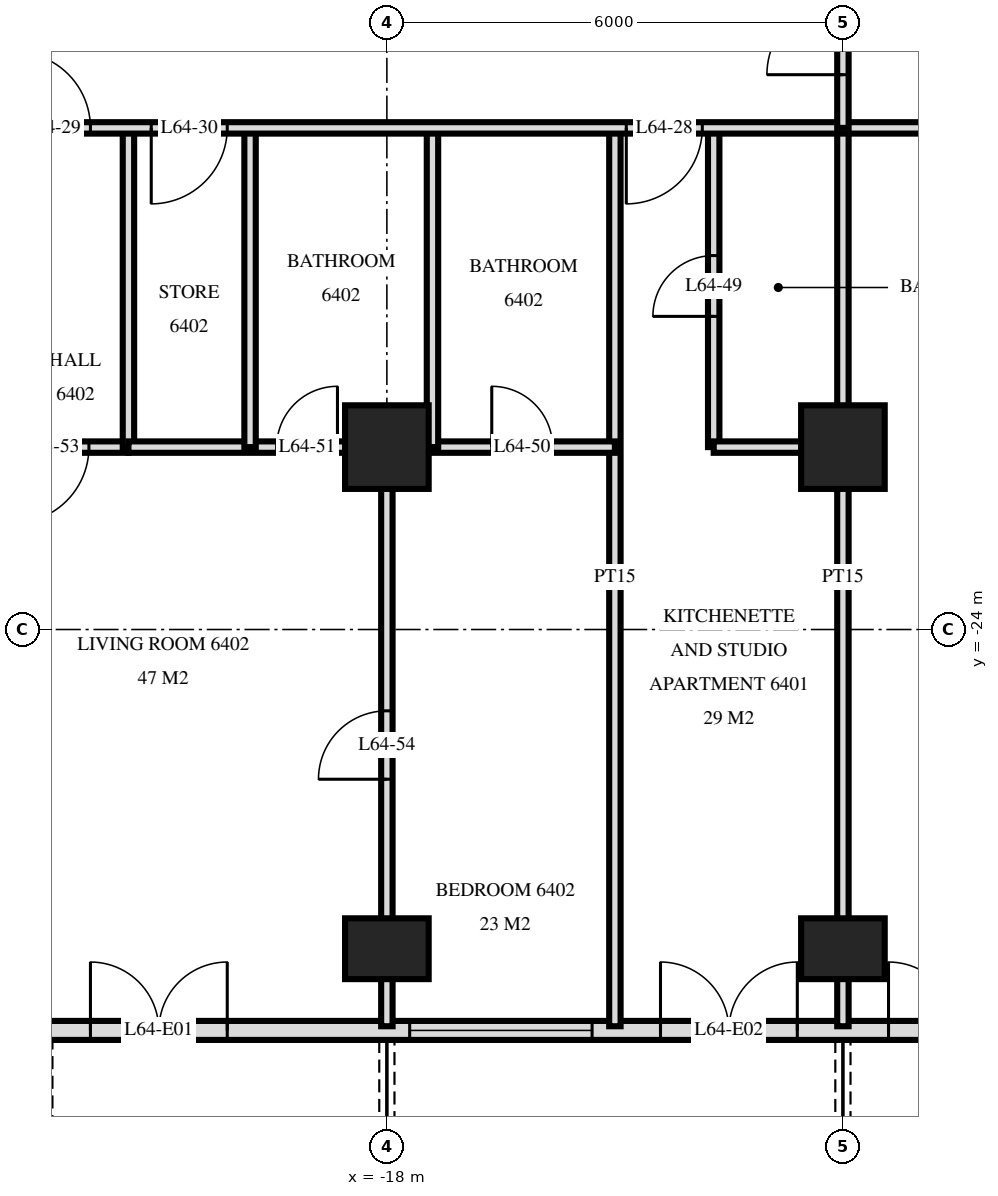
"""IFC4 building model, lengths in metres.
Left out: names, types, materials, properties, quantities, classifications, styles, units other than length and angle.
Written with IfcOpenShell. Run it as: python <this file> out.ifc"""

import sys

from ifc_helpers import new_model, si_unit, direction, frame, frame_2d, origin, origin_2d, place, context, subcontext, project, spatial, rectangle, extrude, element, fill, save


model = new_model("IFC4")
c1 = context("Model", 3, precision=1e-05, world=origin(), true_north=direction((0.0, 1.0)))
c2 = subcontext(c1, "Body", "Model", "MODEL_VIEW")
j1 = project(units=[si_unit("LENGTHUNIT", "METRE"), si_unit("PLANEANGLEUNIT", "RADIAN")], contexts=[c1])
p1 = place(None, origin())
s1 = spatial("IfcSite", under=j1, at=p1, CompositionType="ELEMENT")
p2 = place(p1, origin())
s2 = spatial("IfcBuilding", under=s1, at=p2, CompositionType="ELEMENT")
p3 = place(p2, frame((0.0, 0.0, 243.1)))
s3 = spatial("IfcBuildingStorey", under=s2, at=p3, CompositionType="ELEMENT", Elevation=243.1)
p4 = place(p3, frame((-18.0, -28.2, 0.0), z_axis=(0.0, 0.0, 1.0), x_axis=(1.0, 0.0, 0.0)))
e1 = element("IfcColumn", 1, at=p4, inside=s3, PredefinedType="COLUMN", context=c2, shape_type="SweptSolid", body=[
    extrude(rectangle(XDim=1.1, YDim=0.8, at=origin_2d()), origin(), (0.0, 0.0, 1.0), 3.5),
])
p5 = place(p3, frame((-18.0, -21.6, 0.0), z_axis=(0.0, 0.0, 1.0), x_axis=(1.0, 0.0, 0.0)))
e2 = element("IfcColumn", 2, at=p5, inside=s3, PredefinedType="COLUMN", context=c2, shape_type="SweptSolid", body=[
    extrude(rectangle(XDim=1.1, YDim=1.1, at=origin_2d()), origin(), (0.0, 0.0, 1.0), 3.5),
])
p6 = place(p3, frame((-12.0, -28.2, 0.0), z_axis=(0.0, 0.0, 1.0), x_axis=(1.0, 0.0, 0.0)))
e3 = element("IfcColumn", 3, at=p6, inside=s3, PredefinedType="COLUMN", context=c2, shape_type="SweptSolid", body=[
    extrude(rectangle(XDim=1.1, YDim=0.8, at=origin_2d()), origin(), (0.0, 0.0, 1.0), 3.5),
])
p7 = place(p3, frame((-12.0, -21.6, 0.0), z_axis=(0.0, 0.0, 1.0), x_axis=(1.0, 0.0, 0.0)))
e4 = element("IfcColumn", 4, at=p7, inside=s3, PredefinedType="COLUMN", context=c2, shape_type="SweptSolid", body=[
    extrude(rectangle(XDim=1.1, YDim=1.1, at=origin_2d()), origin(), (0.0, 0.0, 1.0), 3.5),
])
p8 = place(p3, frame((-22.475, -29.275, 0.0), z_axis=(0.0, 0.0, 1.0), x_axis=(1.0, 0.0, 0.0)))
e5 = element("IfcWall", 5, at=p8, inside=s3, PredefinedType="SOLIDWALL", context=c2, shape_type="SweptSolid", body=[
    extrude(rectangle(XDim=44.951, YDim=0.25, at=frame_2d((22.475, 0.0))), origin(), (0.0, 0.0, 1.0), 3.2),
])
p9 = place(p8, frame((0.575, 0.0, 0.0)))
e6 = element("IfcOpeningElement", 6, at=p9, cuts=e5, PredefinedType="OPENING", context=c2, shape_type="SweptSolid", body=[
    extrude(rectangle(XDim=1.8, YDim=2.4, at=frame_2d((0.9, 1.2))), frame((0.0, 0.135, 0.0), z_axis=(0.0, -1.0, 0.0), x_axis=(1.0, 0.0, 0.0)), (0.0, 0.0, 1.0), 0.27),
])
p10 = place(p8, frame((4.775, 0.0, 0.9)))
e7 = element("IfcOpeningElement", 7, at=p10, cuts=e5, PredefinedType="OPENING", context=c2, shape_type="SweptSolid", body=[
    extrude(rectangle(XDim=2.4, YDim=1.5, at=frame_2d((1.2, 0.75))), frame((0.0, 0.135, 0.0), z_axis=(0.0, -1.0, 0.0), x_axis=(1.0, 0.0, 0.0)), (0.0, 0.0, 1.0), 0.27),
])
p11 = place(p8, frame((8.075, 0.0, 0.0)))
e8 = element("IfcOpeningElement", 8, at=p11, cuts=e5, PredefinedType="OPENING", context=c2, shape_type="SweptSolid", body=[
    extrude(rectangle(XDim=1.8, YDim=2.4, at=frame_2d((0.9, 1.2))), frame((0.0, 0.135, 0.0), z_axis=(0.0, -1.0, 0.0), x_axis=(1.0, 0.0, 0.0)), (0.0, 0.0, 1.0), 0.27),
])
p12 = place(p8, frame((11.075, 0.0, 0.0)))
e9 = element("IfcOpeningElement", 9, at=p12, cuts=e5, PredefinedType="OPENING", context=c2, shape_type="SweptSolid", body=[
    extrude(rectangle(XDim=1.8, YDim=2.4, at=frame_2d((0.9, 1.2))), frame((0.0, 0.135, 0.0), z_axis=(0.0, -1.0, 0.0), x_axis=(1.0, 0.0, 0.0)), (0.0, 0.0, 1.0), 0.27),
])
p13 = place(p8, frame((13.775, 0.0, 0.9)))
e10 = element("IfcOpeningElement", 10, at=p13, cuts=e5, PredefinedType="OPENING", context=c2, shape_type="SweptSolid", body=[
    extrude(rectangle(XDim=2.4, YDim=1.5, at=frame_2d((1.2, 0.75))), frame((0.0, 0.135, 0.0), z_axis=(0.0, -1.0, 0.0), x_axis=(1.0, 0.0, 0.0)), (0.0, 0.0, 1.0), 0.27),
])
p14 = place(p8, frame((16.775, 0.0, 0.9)))
e11 = element("IfcOpeningElement", 11, at=p14, cuts=e5, PredefinedType="OPENING", context=c2, shape_type="SweptSolid", body=[
    extrude(rectangle(XDim=2.4, YDim=1.5, at=frame_2d((1.2, 0.75))), frame((0.0, 0.135, 0.0), z_axis=(0.0, -1.0, 0.0), x_axis=(1.0, 0.0, 0.0)), (0.0, 0.0, 1.0), 0.27),
])
p15 = place(p8, frame((20.075, 0.0, 0.0)))
e12 = element("IfcOpeningElement", 12, at=p15, cuts=e5, PredefinedType="OPENING", context=c2, shape_type="SweptSolid", body=[
    extrude(rectangle(XDim=1.8, YDim=2.4, at=frame_2d((0.9, 1.2))), frame((0.0, 0.135, 0.0), z_axis=(0.0, -1.0, 0.0), x_axis=(1.0, 0.0, 0.0)), (0.0, 0.0, 1.0), 0.27),
])
p16 = place(p8, frame((23.075, 0.0, 0.0)))
e13 = element("IfcOpeningElement", 13, at=p16, cuts=e5, PredefinedType="OPENING", context=c2, shape_type="SweptSolid", body=[
    extrude(rectangle(XDim=1.8, YDim=2.4, at=frame_2d((0.9, 1.2))), frame((0.0, 0.135, 0.0), z_axis=(0.0, -1.0, 0.0), x_axis=(1.0, 0.0, 0.0)), (0.0, 0.0, 1.0), 0.27),
])
p17 = place(p8, frame((25.775, 0.0, 0.9)))
e14 = element("IfcOpeningElement", 14, at=p17, cuts=e5, PredefinedType="OPENING", context=c2, shape_type="SweptSolid", body=[
    extrude(rectangle(XDim=2.4, YDim=1.5, at=frame_2d((1.2, 0.75))), frame((0.0, 0.135, 0.0), z_axis=(0.0, -1.0, 0.0), x_axis=(1.0, 0.0, 0.0)), (0.0, 0.0, 1.0), 0.27),
])
p18 = place(p8, frame((29.075, 0.0, 0.0)))
e15 = element("IfcOpeningElement", 15, at=p18, cuts=e5, PredefinedType="OPENING", context=c2, shape_type="SweptSolid", body=[
    extrude(rectangle(XDim=1.8, YDim=2.4, at=frame_2d((0.9, 1.2))), frame((0.0, 0.135, 0.0), z_axis=(0.0, -1.0, 0.0), x_axis=(1.0, 0.0, 0.0)), (0.0, 0.0, 1.0), 0.27),
])
p19 = place(p8, frame((31.775, 0.0, 0.9)))
e16 = element("IfcOpeningElement", 16, at=p19, cuts=e5, PredefinedType="OPENING", context=c2, shape_type="SweptSolid", body=[
    extrude(rectangle(XDim=2.4, YDim=1.5, at=frame_2d((1.2, 0.75))), frame((0.0, 0.135, 0.0), z_axis=(0.0, -1.0, 0.0), x_axis=(1.0, 0.0, 0.0)), (0.0, 0.0, 1.0), 0.27),
])
p20 = place(p8, frame((35.075, 0.0, 0.0)))
e17 = element("IfcOpeningElement", 17, at=p20, cuts=e5, PredefinedType="OPENING", context=c2, shape_type="SweptSolid", body=[
    extrude(rectangle(XDim=1.8, YDim=2.4, at=frame_2d((0.9, 1.2))), frame((0.0, 0.135, 0.0), z_axis=(0.0, -1.0, 0.0), x_axis=(1.0, 0.0, 0.0)), (0.0, 0.0, 1.0), 0.27),
])
p21 = place(p8, frame((41.075, 0.0, 0.0)))
e18 = element("IfcOpeningElement", 18, at=p21, cuts=e5, PredefinedType="OPENING", context=c2, shape_type="SweptSolid", body=[
    extrude(rectangle(XDim=1.8, YDim=2.4, at=frame_2d((0.9, 1.2))), frame((0.0, 0.135, 0.0), z_axis=(0.0, -1.0, 0.0), x_axis=(1.0, 0.0, 0.0)), (0.0, 0.0, 1.0), 0.27),
])
p22 = place(p3, frame((-12.0, -17.4, 0.0), z_axis=(0.0, 0.0, 1.0), x_axis=(0.0, 1.0, 0.0)))
e19 = element("IfcWall", 19, at=p22, inside=s3, PredefinedType="PARTITIONING", context=c2, shape_type="SweptSolid", body=[
    extrude(rectangle(XDim=2.35, YDim=0.15, at=frame_2d((1.175, 0.0))), origin(), (0.0, 0.0, 1.0), 3.22),
])
p23 = place(p22, frame((0.7, 0.0, 0.0)))
e20 = element("IfcOpeningElement", 20, at=p23, cuts=e19, PredefinedType="OPENING", context=c2, shape_type="SweptSolid", body=[
    extrude(rectangle(XDim=1.0, YDim=2.1, at=frame_2d((0.5, 1.05))), frame((0.0, 0.085, 0.0), z_axis=(0.0, -1.0, 0.0), x_axis=(1.0, 0.0, 0.0)), (0.0, 0.0, 1.0), 0.17),
])
p24 = place(p3, frame((-12.0, -29.22, 0.0), z_axis=(0.0, 0.0, 1.0), x_axis=(0.0, 1.0, 0.0)))
e21 = element("IfcWall", 21, at=p24, inside=s3, PredefinedType="PARTITIONING", context=c2, shape_type="SweptSolid", body=[
    extrude(rectangle(XDim=11.82, YDim=0.15, at=frame_2d((5.91, 0.0))), origin(), (0.0, 0.0, 1.0), 3.22),
])
p25 = place(p3, frame((-13.7, -21.6, 0.0), z_axis=(0.0, 0.0, 1.0), x_axis=(0.0, 1.0, 0.0)))
e22 = element("IfcWall", 22, at=p25, inside=s3, PredefinedType="PARTITIONING", context=c2, shape_type="SweptSolid", body=[
    extrude(rectangle(XDim=4.2, YDim=0.15, at=frame_2d((2.1, 0.0))), origin(), (0.0, 0.0, 1.0), 3.22),
])
p26 = place(p25, frame((1.72, 0.0, 0.0)))
e23 = element("IfcOpeningElement", 23, at=p26, cuts=e22, PredefinedType="OPENING", context=c2, shape_type="SweptSolid", body=[
    extrude(rectangle(XDim=0.8, YDim=2.1, at=frame_2d((0.4, 1.05))), frame((0.0, 0.085, 0.0), z_axis=(0.0, -1.0, 0.0), x_axis=(1.0, 0.0, 0.0)), (0.0, 0.0, 1.0), 0.17),
])
p27 = place(p3, frame((-15.0, -29.22, 0.0), z_axis=(0.0, 0.0, 1.0), x_axis=(0.0, 1.0, 0.0)))
e24 = element("IfcWall", 24, at=p27, inside=s3, PredefinedType="PARTITIONING", context=c2, shape_type="SweptSolid", body=[
    extrude(rectangle(XDim=11.82, YDim=0.15, at=frame_2d((5.91, 0.0))), origin(), (0.0, 0.0, 1.0), 3.22),
])
p28 = place(p3, frame((-17.4, -21.6, 0.0), z_axis=(0.0, 0.0, 1.0), x_axis=(0.0, 1.0, 0.0)))
e25 = element("IfcWall", 25, at=p28, inside=s3, PredefinedType="PARTITIONING", context=c2, shape_type="SweptSolid", body=[
    extrude(rectangle(XDim=4.2, YDim=0.15, at=frame_2d((2.1, 0.0))), origin(), (0.0, 0.0, 1.0), 3.22),
])
p29 = place(p3, frame((-18.0, -29.22, 0.0), z_axis=(0.0, 0.0, 1.0), x_axis=(0.0, 1.0, 0.0)))
e26 = element("IfcWall", 26, at=p29, inside=s3, PredefinedType="PARTITIONING", context=c2, shape_type="SweptSolid", body=[
    extrude(rectangle(XDim=7.62, YDim=0.15, at=frame_2d((3.81, 0.0))), origin(), (0.0, 0.0, 1.0), 3.22),
])
p30 = place(p29, frame((3.25, 0.0, 0.0)))
e27 = element("IfcOpeningElement", 27, at=p30, cuts=e26, PredefinedType="OPENING", context=c2, shape_type="SweptSolid", body=[
    extrude(rectangle(XDim=0.9, YDim=2.1, at=frame_2d((0.45, 1.05))), frame((0.0, 0.085, 0.0), z_axis=(0.0, -1.0, 0.0), x_axis=(1.0, 0.0, 0.0)), (0.0, 0.0, 1.0), 0.17),
])
for number, where, z_axis, x_axis in (
    (28, (-19.8, -21.6, 0.0), (0.0, 0.0, 1.0), (0.0, 1.0, 0.0)),
    (29, (-21.4, -21.6, 0.0), (0.0, 0.0, 1.0), (0.0, 1.0, 0.0)),
):
    element("IfcWall", number, at=place(p3, frame(where, z_axis=z_axis, x_axis=x_axis)), inside=s3, PredefinedType="PARTITIONING", context=c2, shape_type="SweptSolid", body=[
        extrude(rectangle(XDim=4.2, YDim=0.15, at=frame_2d((2.1, 0.0))), origin(), (0.0, 0.0, 1.0), 3.22),
    ])
p31 = place(p3, frame((-23.4, -21.6, 0.0), z_axis=(0.0, 0.0, 1.0), x_axis=(1.0, 0.0, 0.0)))
e30 = element("IfcWall", 30, at=p31, inside=s3, PredefinedType="PARTITIONING", context=c2, shape_type="SweptSolid", body=[
    extrude(rectangle(XDim=2.0, YDim=0.15, at=frame_2d((1.0, 0.0))), origin(), (0.0, 0.0, 1.0), 3.22),
])
p32 = place(p31, frame((0.48, 0.0, 0.0)))
e31 = element("IfcOpeningElement", 31, at=p32, cuts=e30, PredefinedType="OPENING", context=c2, shape_type="SweptSolid", body=[
    extrude(rectangle(XDim=1.0, YDim=2.1, at=frame_2d((0.5, 1.05))), frame((0.0, 0.085, 0.0), z_axis=(0.0, -1.0, 0.0), x_axis=(1.0, 0.0, 0.0)), (0.0, 0.0, 1.0), 0.17),
])
p33 = place(p3, frame((-21.4, -21.6, 0.0), z_axis=(0.0, 0.0, 1.0), x_axis=(1.0, 0.0, 0.0)))
e32 = element("IfcWall", 32, at=p33, inside=s3, PredefinedType="PARTITIONING", context=c2, shape_type="SweptSolid", body=[
    extrude(rectangle(XDim=6.4, YDim=0.15, at=frame_2d((3.2, 0.0))), origin(), (0.0, 0.0, 1.0), 3.22),
])
p34 = place(p33, frame((4.78, 0.0, 0.0)))
e33 = element("IfcOpeningElement", 33, at=p34, cuts=e32, PredefinedType="OPENING", context=c2, shape_type="SweptSolid", body=[
    extrude(rectangle(XDim=0.8, YDim=2.1, at=frame_2d((0.4, 1.05))), frame((0.0, 0.085, 0.0), z_axis=(0.0, -1.0, 0.0), x_axis=(1.0, 0.0, 0.0)), (0.0, 0.0, 1.0), 0.17),
])
p35 = place(p33, frame((1.95, 0.0, 0.0)))
e34 = element("IfcOpeningElement", 34, at=p35, cuts=e32, PredefinedType="OPENING", context=c2, shape_type="SweptSolid", body=[
    extrude(rectangle(XDim=0.8, YDim=2.1, at=frame_2d((0.4, 1.05))), frame((0.0, 0.085, 0.0), z_axis=(0.0, -1.0, 0.0), x_axis=(1.0, 0.0, 0.0)), (0.0, 0.0, 1.0), 0.17),
])
p36 = place(p3, frame((-13.7, -21.6, 0.0), z_axis=(0.0, 0.0, 1.0), x_axis=(1.0, 0.0, 0.0)))
e35 = element("IfcWall", 35, at=p36, inside=s3, PredefinedType="PARTITIONING", context=c2, shape_type="SweptSolid", body=[
    extrude(rectangle(XDim=1.7, YDim=0.15, at=frame_2d((0.85, 0.0))), origin(), (0.0, 0.0, 1.0), 3.22),
])
p37 = place(p3, frame((-26.82, -17.4, 0.0), z_axis=(0.0, 0.0, 1.0), x_axis=(1.0, 0.0, 0.0)))
e36 = element("IfcWall", 36, at=p37, inside=s3, PredefinedType="PARTITIONING", context=c2, shape_type="SweptSolid", body=[
    extrude(rectangle(XDim=53.64, YDim=0.15, at=frame_2d((26.82, 0.0))), origin(), (0.0, 0.0, 1.0), 3.22),
])
p38 = place(p37, frame((11.97, 0.0, 0.0)))
e37 = element("IfcOpeningElement", 37, at=p38, cuts=e36, PredefinedType="OPENING", context=c2, shape_type="SweptSolid", body=[
    extrude(rectangle(XDim=1.0, YDim=2.1, at=frame_2d((0.5, 1.05))), frame((0.0, 0.085, 0.0), z_axis=(0.0, -1.0, 0.0), x_axis=(1.0, 0.0, 0.0)), (0.0, 0.0, 1.0), 0.17),
])
p39 = place(p37, frame((3.92, 0.0, 0.0)))
e38 = element("IfcOpeningElement", 38, at=p39, cuts=e36, PredefinedType="OPENING", context=c2, shape_type="SweptSolid", body=[
    extrude(rectangle(XDim=1.0, YDim=2.1, at=frame_2d((0.5, 1.05))), frame((0.0, 0.085, 0.0), z_axis=(0.0, -1.0, 0.0), x_axis=(1.0, 0.0, 0.0)), (0.0, 0.0, 1.0), 0.17),
])
p40 = place(p37, frame((5.72, 0.0, 0.0)))
e39 = element("IfcOpeningElement", 39, at=p40, cuts=e36, PredefinedType="OPENING", context=c2, shape_type="SweptSolid", body=[
    extrude(rectangle(XDim=1.0, YDim=2.1, at=frame_2d((0.5, 1.05))), frame((0.0, 0.085, 0.0), z_axis=(0.0, -1.0, 0.0), x_axis=(1.0, 0.0, 0.0)), (0.0, 0.0, 1.0), 0.17),
])
p41 = place(p37, frame((47.72, 0.0, 0.0)))
e40 = element("IfcOpeningElement", 40, at=p41, cuts=e36, PredefinedType="OPENING", context=c2, shape_type="SweptSolid", body=[
    extrude(rectangle(XDim=1.0, YDim=2.1, at=frame_2d((0.5, 1.05))), frame((0.0, 0.085, 0.0), z_axis=(0.0, -1.0, 0.0), x_axis=(1.0, 0.0, 0.0)), (0.0, 0.0, 1.0), 0.17),
])
p42 = place(p37, frame((51.02, 0.0, 0.0)))
e41 = element("IfcOpeningElement", 41, at=p42, cuts=e36, PredefinedType="OPENING", context=c2, shape_type="SweptSolid", body=[
    extrude(rectangle(XDim=1.0, YDim=2.1, at=frame_2d((0.5, 1.05))), frame((0.0, 0.085, 0.0), z_axis=(0.0, -1.0, 0.0), x_axis=(1.0, 0.0, 0.0)), (0.0, 0.0, 1.0), 0.17),
])
p43 = place(p37, frame((17.32, 0.0, 0.0)))
e42 = element("IfcOpeningElement", 42, at=p43, cuts=e36, PredefinedType="OPENING", context=c2, shape_type="SweptSolid", body=[
    extrude(rectangle(XDim=1.0, YDim=2.1, at=frame_2d((0.5, 1.05))), frame((0.0, 0.085, 0.0), z_axis=(0.0, -1.0, 0.0), x_axis=(1.0, 0.0, 0.0)), (0.0, 0.0, 1.0), 0.17),
])
p44 = place(p37, frame((23.32, 0.0, 0.0)))
e43 = element("IfcOpeningElement", 43, at=p44, cuts=e36, PredefinedType="OPENING", context=c2, shape_type="SweptSolid", body=[
    extrude(rectangle(XDim=1.0, YDim=2.1, at=frame_2d((0.5, 1.05))), frame((0.0, 0.085, 0.0), z_axis=(0.0, -1.0, 0.0), x_axis=(1.0, 0.0, 0.0)), (0.0, 0.0, 1.0), 0.17),
])
p45 = place(p37, frame((29.32, 0.0, 0.0)))
e44 = element("IfcOpeningElement", 44, at=p45, cuts=e36, PredefinedType="OPENING", context=c2, shape_type="SweptSolid", body=[
    extrude(rectangle(XDim=1.0, YDim=2.1, at=frame_2d((0.5, 1.05))), frame((0.0, 0.085, 0.0), z_axis=(0.0, -1.0, 0.0), x_axis=(1.0, 0.0, 0.0)), (0.0, 0.0, 1.0), 0.17),
])
p46 = place(p37, frame((35.32, 0.0, 0.0)))
e45 = element("IfcOpeningElement", 45, at=p46, cuts=e36, PredefinedType="OPENING", context=c2, shape_type="SweptSolid", body=[
    extrude(rectangle(XDim=1.0, YDim=2.1, at=frame_2d((0.5, 1.05))), frame((0.0, 0.085, 0.0), z_axis=(0.0, -1.0, 0.0), x_axis=(1.0, 0.0, 0.0)), (0.0, 0.0, 1.0), 0.17),
])
p47 = place(p9, origin())
e46 = element("IfcDoor", 46, at=p47, inside=s3, OperationType="DOUBLE_DOOR_SINGLE_SWING", PredefinedType="DOOR", context=c2, shape_type="SweptSolid", body=[
    extrude(rectangle(XDim=1.8, YDim=2.4, at=frame_2d((0.9, 1.2))), frame((0.0, 0.025, 0.0), z_axis=(0.0, -1.0, 0.0), x_axis=(1.0, 0.0, 0.0)), (0.0, 0.0, 1.0), 0.05),
])
fill(e6, e46)
p48 = place(p10, origin())
e47 = element("IfcWindow", 47, at=p48, inside=s3, PartitioningType="SINGLE_PANEL", PredefinedType="WINDOW", context=c2, shape_type="SweptSolid", body=[
    extrude(rectangle(XDim=2.4, YDim=1.5, at=frame_2d((1.2, 0.75))), frame((0.0, 0.03, 0.0), z_axis=(0.0, -1.0, 0.0), x_axis=(1.0, 0.0, 0.0)), (0.0, 0.0, 1.0), 0.06),
])
fill(e7, e47)
p49 = place(p11, origin())
e48 = element("IfcDoor", 48, at=p49, inside=s3, OperationType="DOUBLE_DOOR_SINGLE_SWING", PredefinedType="DOOR", context=c2, shape_type="SweptSolid", body=[
    extrude(rectangle(XDim=1.8, YDim=2.4, at=frame_2d((0.9, 1.2))), frame((0.0, 0.025, 0.0), z_axis=(0.0, -1.0, 0.0), x_axis=(1.0, 0.0, 0.0)), (0.0, 0.0, 1.0), 0.05),
])
fill(e8, e48)
p50 = place(p12, origin())
e49 = element("IfcDoor", 49, at=p50, inside=s3, OperationType="DOUBLE_DOOR_SINGLE_SWING", PredefinedType="DOOR", context=c2, shape_type="SweptSolid", body=[
    extrude(rectangle(XDim=1.8, YDim=2.4, at=frame_2d((0.9, 1.2))), frame((0.0, 0.025, 0.0), z_axis=(0.0, -1.0, 0.0), x_axis=(1.0, 0.0, 0.0)), (0.0, 0.0, 1.0), 0.05),
])
fill(e9, e49)
p51 = place(p23, origin())
e50 = element("IfcDoor", 50, at=p51, inside=s3, OperationType="SINGLE_SWING_RIGHT", PredefinedType="DOOR", context=c2, shape_type="SweptSolid", body=[
    extrude(rectangle(XDim=1.0, YDim=2.1, at=frame_2d((0.5, 1.05))), frame((0.0, 0.025, 0.0), z_axis=(0.0, -1.0, 0.0), x_axis=(1.0, 0.0, 0.0)), (0.0, 0.0, 1.0), 0.05),
])
fill(e20, e50)
p52 = place(p38, frame((0.5, 0.0, 0.0), z_axis=(0.0, 0.0, 1.0), x_axis=(-1.0, 0.0, 0.0)))
e51 = element("IfcDoor", 51, at=p52, inside=s3, OperationType="SINGLE_SWING_LEFT", PredefinedType="DOOR", context=c2, shape_type="SweptSolid", body=[
    extrude(rectangle(XDim=1.0, YDim=2.1, at=frame_2d((0.0, 1.05))), frame((0.0, -0.025, 0.0), z_axis=(0.0, 1.0, 0.0), x_axis=(-1.0, 0.0, 0.0)), (0.0, 0.0, 1.0), 0.05),
])
fill(e37, e51)
p53 = place(p39, origin())
e52 = element("IfcDoor", 52, at=p53, inside=s3, OperationType="SINGLE_SWING_RIGHT", PredefinedType="DOOR", context=c2, shape_type="SweptSolid", body=[
    extrude(rectangle(XDim=1.0, YDim=2.1, at=frame_2d((0.5, 1.05))), frame((0.0, 0.025, 0.0), z_axis=(0.0, -1.0, 0.0), x_axis=(1.0, 0.0, 0.0)), (0.0, 0.0, 1.0), 0.05),
])
fill(e38, e52)
p54 = place(p40, frame((0.5, 0.0, 0.0), z_axis=(0.0, 0.0, 1.0), x_axis=(-1.0, 0.0, 0.0)))
e53 = element("IfcDoor", 53, at=p54, inside=s3, OperationType="SINGLE_SWING_LEFT", PredefinedType="DOOR", context=c2, shape_type="SweptSolid", body=[
    extrude(rectangle(XDim=1.0, YDim=2.1, at=frame_2d((0.0, 1.05))), frame((0.0, -0.025, 0.0), z_axis=(0.0, 1.0, 0.0), x_axis=(-1.0, 0.0, 0.0)), (0.0, 0.0, 1.0), 0.05),
])
fill(e39, e53)
p55 = place(p26, origin())
e54 = element("IfcDoor", 54, at=p55, inside=s3, OperationType="SINGLE_SWING_RIGHT", PredefinedType="DOOR", context=c2, shape_type="SweptSolid", body=[
    extrude(rectangle(XDim=0.8, YDim=2.1, at=frame_2d((0.4, 1.05))), frame((0.0, 0.025, 0.0), z_axis=(0.0, -1.0, 0.0), x_axis=(1.0, 0.0, 0.0)), (0.0, 0.0, 1.0), 0.05),
])
fill(e23, e54)
p56 = place(p34, origin())
e55 = element("IfcDoor", 55, at=p56, inside=s3, OperationType="SINGLE_SWING_RIGHT", PredefinedType="DOOR", context=c2, shape_type="SweptSolid", body=[
    extrude(rectangle(XDim=0.8, YDim=2.1, at=frame_2d((0.4, 1.05))), frame((0.0, 0.025, 0.0), z_axis=(0.0, -1.0, 0.0), x_axis=(1.0, 0.0, 0.0)), (0.0, 0.0, 1.0), 0.05),
])
fill(e33, e55)
p57 = place(p35, origin())
e56 = element("IfcDoor", 56, at=p57, inside=s3, OperationType="SINGLE_SWING_LEFT", PredefinedType="DOOR", context=c2, shape_type="SweptSolid", body=[
    extrude(rectangle(XDim=0.8, YDim=2.1, at=frame_2d((0.4, 1.05))), frame((0.0, 0.025, 0.0), z_axis=(0.0, -1.0, 0.0), x_axis=(1.0, 0.0, 0.0)), (0.0, 0.0, 1.0), 0.05),
])
fill(e34, e56)
p58 = place(p32, frame((0.5, 0.0, 0.0), z_axis=(0.0, 0.0, 1.0), x_axis=(-1.0, 0.0, 0.0)))
e57 = element("IfcDoor", 57, at=p58, inside=s3, OperationType="SINGLE_SWING_LEFT", PredefinedType="DOOR", context=c2, shape_type="SweptSolid", body=[
    extrude(rectangle(XDim=1.0, YDim=2.1, at=frame_2d((0.0, 1.05))), frame((0.0, -0.025, 0.0), z_axis=(0.0, 1.0, 0.0), x_axis=(-1.0, 0.0, 0.0)), (0.0, 0.0, 1.0), 0.05),
])
fill(e31, e57)
p59 = place(p30, origin())
e58 = element("IfcDoor", 58, at=p59, inside=s3, OperationType="SINGLE_SWING_RIGHT", PredefinedType="DOOR", context=c2, shape_type="SweptSolid", body=[
    extrude(rectangle(XDim=0.9, YDim=2.1, at=frame_2d((0.45, 1.05))), frame((0.0, 0.025, 0.0), z_axis=(0.0, -1.0, 0.0), x_axis=(1.0, 0.0, 0.0)), (0.0, 0.0, 1.0), 0.05),
])
fill(e27, e58)
save(model, sys.argv[1])
